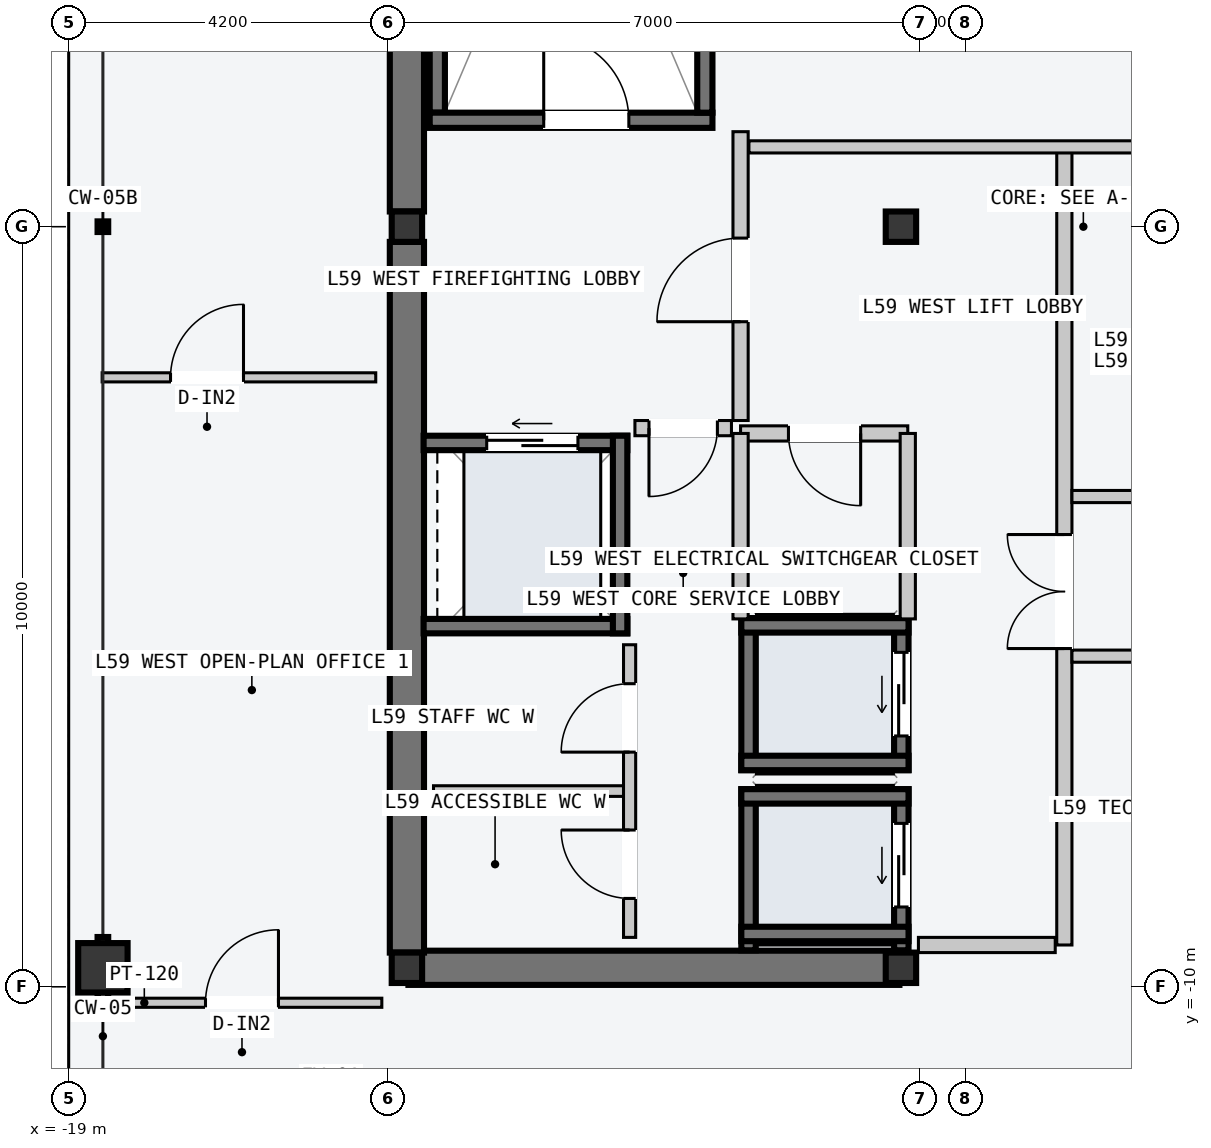
"""IFC4 building model, lengths in metres.
Left out: names, types, materials, properties, quantities, classifications, styles, units other than length and angle.
Written with IfcOpenShell. Run it as: python <this file> out.ifc"""

import sys

from ifc_helpers import new_model, si_unit, direction, frame, frame_2d, origin, origin_2d, place, context, subcontext, project, spatial, rectangle, hollow_rectangle, i_section, extrude, element, fill, save


model = new_model("IFC4")
c1 = context("Model", 3, precision=1e-05, world=origin(), true_north=direction((0.0, 1.0)))
c2 = subcontext(c1, "Body", "Model", "MODEL_VIEW")
j1 = project(units=[si_unit("LENGTHUNIT", "METRE"), si_unit("PLANEANGLEUNIT", "RADIAN")], contexts=[c1])
p1 = place(None, origin())
s1 = spatial("IfcSite", under=j1, at=p1, CompositionType="ELEMENT")
p2 = place(p1, origin())
s2 = spatial("IfcBuilding", under=s1, at=p2, CompositionType="ELEMENT")
p3 = place(p2, frame((0.0, 0.0, 225.6)))
s3 = spatial("IfcBuildingStorey", under=s2, at=p3, CompositionType="ELEMENT", Elevation=225.6)
p4 = place(p3, frame((-14.53, -9.75, -0.2), z_axis=(0.0, 0.0, 1.0), x_axis=(1.0, 0.0, 0.0)))
e1 = element("IfcWall", 1, at=p4, inside=s3, PredefinedType="SHEAR", context=c2, shape_type="SweptSolid", body=[
    extrude(rectangle(XDim=6.46, YDim=0.45, at=frame_2d((3.23, 0.0))), origin(), (0.0, 0.0, 1.0), 3.6),
])
for number, where, z_axis, x_axis in (
    (2, (-14.55, -9.55, -0.2), (0.0, 0.0, 1.0), (0.0, 1.0, 0.0)),
    (3, (-14.55, 0.2, -0.2), (0.0, 0.0, 1.0), (0.0, 1.0, 0.0)),
):
    element("IfcWall", number, at=place(p3, frame(where, z_axis=z_axis, x_axis=x_axis)), inside=s3, PredefinedType="SHEAR", context=c2, shape_type="SweptSolid", body=[
        extrude(rectangle(XDim=9.35, YDim=0.45, at=frame_2d((4.675, 0.0))), origin(), (0.0, 0.0, 1.0), 3.6),
    ])
p5 = place(p3, frame((-14.15, 1.5, -0.2), z_axis=(0.0, 0.0, 1.0), x_axis=(0.0, 1.0, 0.0)))
e4 = element("IfcWall", 4, at=p5, inside=s3, PredefinedType="SOLIDWALL", context=c2, shape_type="SweptSolid", body=[
    extrude(rectangle(XDim=7.8, YDim=0.2, at=frame_2d((3.9, 0.0))), origin(), (0.0, 0.0, 1.0), 3.6),
])
p6 = place(p3, frame((-14.25, 1.4, -0.2), z_axis=(0.0, 0.0, 1.0), x_axis=(1.0, 0.0, 0.0)))
e5 = element("IfcWall", 5, at=p6, inside=s3, PredefinedType="SOLIDWALL", context=c2, shape_type="SweptSolid", body=[
    extrude(rectangle(XDim=3.72, YDim=0.2, at=frame_2d((1.86, 0.0))), origin(), (0.0, 0.0, 1.0), 3.6),
])
p7 = place(p6, frame((1.5, 0.0, 0.2)))
e6 = element("IfcOpeningElement", 6, at=p7, cuts=e5, PredefinedType="OPENING", context=c2, shape_type="SweptSolid", body=[
    extrude(rectangle(XDim=1.12, YDim=2.18, at=frame_2d((0.56, 1.09))), frame((0.0, 0.11, 0.0), z_axis=(0.0, -1.0, 0.0), x_axis=(1.0, 0.0, 0.0)), (0.0, 0.0, 1.0), 0.22),
])
p8 = place(p3, frame((-10.63, 1.5, -0.2), z_axis=(0.0, 0.0, 1.0), x_axis=(0.0, 1.0, 0.0)))
e7 = element("IfcWall", 7, at=p8, inside=s3, PredefinedType="SOLIDWALL", context=c2, shape_type="SweptSolid", body=[
    extrude(rectangle(XDim=7.8, YDim=0.2, at=frame_2d((3.9, 0.0))), origin(), (0.0, 0.0, 1.0), 3.6),
])
for number, where, z_axis, x_axis in (
    (8, (-14.55, -9.75, 0.0), (0.0, 0.0, 1.0), (1.0, 0.0, 0.0)),
    (9, (-14.55, 0.0, 0.0), (0.0, 0.0, 1.0), (1.0, 0.0, 0.0)),
    (10, (-8.05, -9.75, 0.0), (0.0, 0.0, 1.0), (1.0, 0.0, 0.0)),
    (11, (-8.05, 0.0, 0.0), (0.0, 0.0, 1.0), (1.0, 0.0, 0.0)),
):
    element("IfcColumn", number, at=place(p3, frame(where, z_axis=z_axis, x_axis=x_axis)), inside=s3, PredefinedType="COLUMN", context=c2, shape_type="SweptSolid", body=[
        extrude(i_section(OverallWidth=0.4, OverallDepth=0.4, WebThickness=0.013, FlangeThickness=0.021, at=origin_2d()), origin(), (0.0, 0.0, 1.0), 3.6),
    ])
p9 = place(p3, frame((-18.55, -9.75, 0.0), z_axis=(0.0, 0.0, 1.0), x_axis=(0.0, 1.0, 0.0)))
e12 = element("IfcColumn", 12, at=p9, inside=s3, PredefinedType="COLUMN", context=c2, shape_type="SweptSolid", body=[
    extrude(hollow_rectangle(XDim=0.65, YDim=0.65, WallThickness=0.028, at=origin_2d()), origin(), (0.0, 0.0, 1.0), 3.6),
])
p10 = place(p3, frame((-8.045, -9.52, -0.2), z_axis=(0.0, 0.0, 1.0), x_axis=(0.0, 1.0, 0.0)))
e13 = element("IfcWall", 13, at=p10, inside=s3, PredefinedType="SOLIDWALL", context=c2, shape_type="SweptSolid", body=[
    extrude(rectangle(XDim=2.12, YDim=0.19, at=frame_2d((1.06, 0.0))), origin(), (0.0, 0.0, 1.0), 3.6),
])
p11 = place(p10, frame((0.57, 0.0, 0.2)))
e14 = element("IfcOpeningElement", 14, at=p11, cuts=e13, PredefinedType="OPENING", context=c2, shape_type="SweptSolid", body=[
    extrude(rectangle(XDim=1.1, YDim=2.2, at=frame_2d((0.55, 1.1))), frame((0.0, 0.105, 0.0), z_axis=(0.0, -1.0, 0.0), x_axis=(1.0, 0.0, 0.0)), (0.0, 0.0, 1.0), 0.21),
])
p12 = place(p3, frame((-10.055, -9.52, -0.2), z_axis=(0.0, 0.0, 1.0), x_axis=(0.0, 1.0, 0.0)))
e15 = element("IfcWall", 15, at=p12, inside=s3, PredefinedType="SOLIDWALL", context=c2, shape_type="SweptSolid", body=[
    extrude(rectangle(XDim=2.12, YDim=0.19, at=frame_2d((1.06, 0.0))), origin(), (0.0, 0.0, 1.0), 3.6),
])
for number, where, z_axis, x_axis in (
    (16, (-10.15, -7.495, -0.2), (0.0, 0.0, 1.0), (1.0, 0.0, 0.0)),
    (17, (-10.15, -9.305, -0.2), (0.0, 0.0, 1.0), (1.0, 0.0, 0.0)),
):
    element("IfcWall", number, at=place(p3, frame(where, z_axis=z_axis, x_axis=x_axis)), inside=s3, PredefinedType="SOLIDWALL", context=c2, shape_type="SweptSolid", body=[
        extrude(rectangle(XDim=2.2, YDim=0.19, at=frame_2d((1.1, 0.0))), origin(), (0.0, 0.0, 1.0), 3.6),
    ])
p13 = place(p3, frame((-8.045, -7.15, -0.2), z_axis=(0.0, 0.0, 1.0), x_axis=(0.0, 1.0, 0.0)))
e18 = element("IfcWall", 18, at=p13, inside=s3, PredefinedType="SOLIDWALL", context=c2, shape_type="SweptSolid", body=[
    extrude(rectangle(XDim=2.0, YDim=0.19, at=frame_2d((1.0, 0.0))), origin(), (0.0, 0.0, 1.0), 3.6),
])
p14 = place(p13, frame((0.45, 0.0, 0.2)))
e19 = element("IfcOpeningElement", 19, at=p14, cuts=e18, PredefinedType="OPENING", context=c2, shape_type="SweptSolid", body=[
    extrude(rectangle(XDim=1.1, YDim=2.2, at=frame_2d((0.55, 1.1))), frame((0.0, 0.105, 0.0), z_axis=(0.0, -1.0, 0.0), x_axis=(1.0, 0.0, 0.0)), (0.0, 0.0, 1.0), 0.21),
])
p15 = place(p3, frame((-10.055, -7.15, -0.2), z_axis=(0.0, 0.0, 1.0), x_axis=(0.0, 1.0, 0.0)))
e20 = element("IfcWall", 20, at=p15, inside=s3, PredefinedType="SOLIDWALL", context=c2, shape_type="SweptSolid", body=[
    extrude(rectangle(XDim=2.0, YDim=0.19, at=frame_2d((1.0, 0.0))), origin(), (0.0, 0.0, 1.0), 3.6),
])
for number, where, z_axis, x_axis in (
    (21, (-10.15, -5.245, -0.2), (0.0, 0.0, 1.0), (1.0, 0.0, 0.0)),
    (22, (-10.15, -7.055, -0.2), (0.0, 0.0, 1.0), (1.0, 0.0, 0.0)),
):
    element("IfcWall", number, at=place(p3, frame(where, z_axis=z_axis, x_axis=x_axis)), inside=s3, PredefinedType="SOLIDWALL", context=c2, shape_type="SweptSolid", body=[
        extrude(rectangle(XDim=2.2, YDim=0.19, at=frame_2d((1.1, 0.0))), origin(), (0.0, 0.0, 1.0), 3.6),
    ])
p16 = place(p3, frame((-14.33, -2.845, -0.2), z_axis=(0.0, 0.0, 1.0), x_axis=(1.0, 0.0, 0.0)))
e23 = element("IfcWall", 23, at=p16, inside=s3, PredefinedType="SOLIDWALL", context=c2, shape_type="SweptSolid", body=[
    extrude(rectangle(XDim=2.68, YDim=0.19, at=frame_2d((1.34, 0.0))), origin(), (0.0, 0.0, 1.0), 3.6),
])
p17 = place(p16, frame((0.83, 0.0, 0.2)))
e24 = element("IfcOpeningElement", 24, at=p17, cuts=e23, PredefinedType="OPENING", context=c2, shape_type="SweptSolid", body=[
    extrude(rectangle(XDim=1.2, YDim=2.2, at=frame_2d((0.6, 1.1))), frame((0.0, 0.105, 0.0), z_axis=(0.0, -1.0, 0.0), x_axis=(1.0, 0.0, 0.0)), (0.0, 0.0, 1.0), 0.21),
])
p18 = place(p3, frame((-14.33, -5.255, -0.2), z_axis=(0.0, 0.0, 1.0), x_axis=(1.0, 0.0, 0.0)))
e25 = element("IfcWall", 25, at=p18, inside=s3, PredefinedType="SOLIDWALL", context=c2, shape_type="SweptSolid", body=[
    extrude(rectangle(XDim=2.68, YDim=0.19, at=frame_2d((1.34, 0.0))), origin(), (0.0, 0.0, 1.0), 3.6),
])
p19 = place(p3, frame((-11.745, -5.35, -0.2), z_axis=(0.0, 0.0, 1.0), x_axis=(0.0, 1.0, 0.0)))
e26 = element("IfcWall", 26, at=p19, inside=s3, PredefinedType="SOLIDWALL", context=c2, shape_type="SweptSolid", body=[
    extrude(rectangle(XDim=2.6, YDim=0.19, at=frame_2d((1.3, 0.0))), origin(), (0.0, 0.0, 1.0), 3.6),
])
p20 = place(p3, frame((-5.9, -9.45, 0.0), z_axis=(0.0, 0.0, 1.0), x_axis=(0.0, 1.0, 0.0)))
e27 = element("IfcWall", 27, at=p20, inside=s3, PredefinedType="PARTITIONING", context=c2, shape_type="SweptSolid", body=[
    extrude(rectangle(XDim=10.5, YDim=0.2, at=frame_2d((5.25, 0.0))), origin(), (0.0, 0.0, 1.0), 3.4),
])
p21 = place(p20, frame((3.9, 0.0, 0.0)))
e28 = element("IfcOpeningElement", 28, at=p21, cuts=e27, PredefinedType="OPENING", context=c2, shape_type="SweptSolid", body=[
    extrude(rectangle(XDim=1.5, YDim=2.2, at=frame_2d((0.75, 1.1))), frame((0.0, 0.11, 0.0), z_axis=(0.0, -1.0, 0.0), x_axis=(1.0, 0.0, 0.0)), (0.0, 0.0, 1.0), 0.22),
])
p22 = place(p3, frame((-6.02, -9.45, 0.0), z_axis=(0.0, 0.0, 1.0), x_axis=(-1.0, 0.0, 0.0)))
e29 = element("IfcWall", 29, at=p22, inside=s3, PredefinedType="PARTITIONING", context=c2, shape_type="SweptSolid", body=[
    extrude(rectangle(XDim=1.8, YDim=0.2, at=frame_2d((0.9, 0.0))), origin(), (0.0, 0.0, 1.0), 3.4),
])
p23 = place(p3, frame((-10.16, -2.55, 0.0), z_axis=(0.0, 0.0, 1.0), x_axis=(0.0, 1.0, 0.0)))
e30 = element("IfcWall", 30, at=p23, inside=s3, PredefinedType="PARTITIONING", context=c2, shape_type="SweptSolid", body=[
    extrude(rectangle(XDim=3.8, YDim=0.2, at=frame_2d((1.9, 0.0))), origin(), (0.0, 0.0, 1.0), 3.4),
])
p24 = place(p23, frame((1.3, 0.0, 0.0)))
e31 = element("IfcOpeningElement", 31, at=p24, cuts=e30, PredefinedType="OPENING", context=c2, shape_type="SweptSolid", body=[
    extrude(rectangle(XDim=1.1, YDim=2.15, at=frame_2d((0.55, 1.075))), frame((0.0, 0.11, 0.0), z_axis=(0.0, -1.0, 0.0), x_axis=(1.0, 0.0, 0.0)), (0.0, 0.0, 1.0), 0.22),
])
p25 = place(p3, frame((-10.28, -2.65, 0.0), z_axis=(0.0, 0.0, 1.0), x_axis=(-1.0, 0.0, 0.0)))
e32 = element("IfcWall", 32, at=p25, inside=s3, PredefinedType="PARTITIONING", context=c2, shape_type="SweptSolid", body=[
    extrude(rectangle(XDim=1.27, YDim=0.2, at=frame_2d((0.635, 0.0))), origin(), (0.0, 0.0, 1.0), 3.4),
])
p26 = place(p25, frame((0.185, 0.0, 0.0)))
e33 = element("IfcOpeningElement", 33, at=p26, cuts=e32, PredefinedType="OPENING", context=c2, shape_type="SweptSolid", body=[
    extrude(rectangle(XDim=0.9, YDim=2.15, at=frame_2d((0.45, 1.075))), frame((0.0, 0.11, 0.0), z_axis=(0.0, -1.0, 0.0), x_axis=(1.0, 0.0, 0.0)), (0.0, 0.0, 1.0), 0.22),
])
p27 = place(p3, frame((-7.96, -2.72, 0.0), z_axis=(0.0, 0.0, 1.0), x_axis=(-1.0, 0.0, 0.0)))
e34 = element("IfcWall", 34, at=p27, inside=s3, PredefinedType="PARTITIONING", context=c2, shape_type="SweptSolid", body=[
    extrude(rectangle(XDim=2.2, YDim=0.2, at=frame_2d((1.1, 0.0))), origin(), (0.0, 0.0, 1.0), 3.4),
])
p28 = place(p27, frame((0.62, 0.0, 0.0)))
e35 = element("IfcOpeningElement", 35, at=p28, cuts=e34, PredefinedType="OPENING", context=c2, shape_type="SweptSolid", body=[
    extrude(rectangle(XDim=0.95, YDim=2.1, at=frame_2d((0.475, 1.05))), frame((0.0, 0.11, 0.0), z_axis=(0.0, -1.0, 0.0), x_axis=(1.0, 0.0, 0.0)), (0.0, 0.0, 1.0), 0.22),
])
for number, where, z_axis, x_axis in (
    (36, (-7.96, -5.16, 0.0), (0.0, 0.0, 1.0), (0.0, 1.0, 0.0)),
    (37, (-10.16, -5.16, 0.0), (0.0, 0.0, 1.0), (0.0, 1.0, 0.0)),
):
    element("IfcWall", number, at=place(p3, frame(where, z_axis=z_axis, x_axis=x_axis)), inside=s3, PredefinedType="PARTITIONING", context=c2, shape_type="SweptSolid", body=[
        extrude(rectangle(XDim=2.44, YDim=0.2, at=frame_2d((1.22, 0.0))), origin(), (0.0, 0.0, 1.0), 3.4),
    ])
p29 = place(p3, frame((-11.7, -7.425, 0.0), z_axis=(0.0, 0.0, 1.0), x_axis=(-1.0, 0.0, 0.0)))
e38 = element("IfcWall", 38, at=p29, inside=s3, PredefinedType="PARTITIONING", context=c2, shape_type="SweptSolid", body=[
    extrude(rectangle(XDim=2.5, YDim=0.14, at=frame_2d((1.25, 0.0))), origin(), (0.0, 0.0, 1.0), 3.4),
])
p30 = place(p3, frame((-11.62, -9.35, 0.0), z_axis=(0.0, 0.0, 1.0), x_axis=(0.0, 1.0, 0.0)))
e39 = element("IfcWall", 39, at=p30, inside=s3, PredefinedType="PARTITIONING", context=c2, shape_type="SweptSolid", body=[
    extrude(rectangle(XDim=3.85, YDim=0.16, at=frame_2d((1.925, 0.0))), origin(), (0.0, 0.0, 1.0), 3.4),
])
p31 = place(p30, frame((0.512, 0.0, 0.0)))
e40 = element("IfcOpeningElement", 40, at=p31, cuts=e39, PredefinedType="OPENING", context=c2, shape_type="SweptSolid", body=[
    extrude(rectangle(XDim=0.9, YDim=2.15, at=frame_2d((0.45, 1.075))), frame((0.0, 0.09, 0.0), z_axis=(0.0, -1.0, 0.0), x_axis=(1.0, 0.0, 0.0)), (0.0, 0.0, 1.0), 0.18),
])
p32 = place(p30, frame((2.438, 0.0, 0.0)))
e41 = element("IfcOpeningElement", 41, at=p32, cuts=e39, PredefinedType="OPENING", context=c2, shape_type="SweptSolid", body=[
    extrude(rectangle(XDim=0.9, YDim=2.15, at=frame_2d((0.45, 1.075))), frame((0.0, 0.09, 0.0), z_axis=(0.0, -1.0, 0.0), x_axis=(1.0, 0.0, 0.0)), (0.0, 0.0, 1.0), 0.18),
])
p33 = place(p3, frame((-10.05, 1.05, 0.0), z_axis=(0.0, 0.0, 1.0), x_axis=(1.0, 0.0, 0.0)))
e42 = element("IfcWall", 42, at=p33, inside=s3, PredefinedType="PARTITIONING", context=c2, shape_type="SweptSolid", body=[
    extrude(rectangle(XDim=8.79, YDim=0.16, at=frame_2d((4.395, 0.0))), origin(), (0.0, 0.0, 1.0), 3.4),
])
for number, where, z_axis, x_axis in (
    (43, (-5.8, -3.55, 0.0), (0.0, 0.0, 1.0), (1.0, 0.0, 0.0)),
    (44, (-5.8, -5.65, 0.0), (0.0, 0.0, 1.0), (1.0, 0.0, 0.0)),
):
    element("IfcWall", number, at=place(p3, frame(where, z_axis=z_axis, x_axis=x_axis)), inside=s3, PredefinedType="PARTITIONING", context=c2, shape_type="SweptSolid", body=[
        extrude(rectangle(XDim=4.54, YDim=0.16, at=frame_2d((2.27, 0.0))), origin(), (0.0, 0.0, 1.0), 3.4),
    ])
p34 = place(p3, frame((-18.56, -10.21, 0.0), z_axis=(0.0, 0.0, 1.0), x_axis=(1.0, 0.0, 0.0)))
e45 = element("IfcWall", 45, at=p34, inside=s3, PredefinedType="PARTITIONING", context=c2, shape_type="SweptSolid", body=[
    extrude(rectangle(XDim=3.68, YDim=0.12, at=frame_2d((1.84, 0.0))), origin(), (0.0, 0.0, 1.0), 3.4),
])
p35 = place(p34, frame((1.36, 0.0, 0.0)))
e46 = element("IfcOpeningElement", 46, at=p35, cuts=e45, PredefinedType="OPENING", context=c2, shape_type="SweptSolid", body=[
    extrude(rectangle(XDim=0.96, YDim=2.18, at=frame_2d((0.48, 1.09))), frame((0.0, 0.07, 0.0), z_axis=(0.0, -1.0, 0.0), x_axis=(1.0, 0.0, 0.0)), (0.0, 0.0, 1.0), 0.14),
])
p36 = place(p3, frame((-18.56, -1.982, 0.0), z_axis=(0.0, 0.0, 1.0), x_axis=(1.0, 0.0, 0.0)))
e47 = element("IfcWall", 47, at=p36, inside=s3, PredefinedType="PARTITIONING", context=c2, shape_type="SweptSolid", body=[
    extrude(rectangle(XDim=3.6, YDim=0.12, at=frame_2d((1.8, 0.0))), origin(), (0.0, 0.0, 1.0), 3.4),
])
p37 = place(p36, frame((0.9, 0.0, 0.0)))
e48 = element("IfcOpeningElement", 48, at=p37, cuts=e47, PredefinedType="OPENING", context=c2, shape_type="SweptSolid", body=[
    extrude(rectangle(XDim=0.96, YDim=2.18, at=frame_2d((0.48, 1.09))), frame((0.0, 0.07, 0.0), z_axis=(0.0, -1.0, 0.0), x_axis=(1.0, 0.0, 0.0)), (0.0, 0.0, 1.0), 0.14),
])
p38 = place(p7, origin())
e49 = element("IfcDoor", 49, at=p38, inside=s3, OperationType="SINGLE_SWING_LEFT", PredefinedType="DOOR", context=c2, shape_type="SweptSolid", body=[
    extrude(rectangle(XDim=1.12, YDim=2.18, at=frame_2d((0.56, 1.09))), frame((0.0, 0.025, 0.0), z_axis=(0.0, -1.0, 0.0), x_axis=(1.0, 0.0, 0.0)), (0.0, 0.0, 1.0), 0.05),
])
fill(e6, e49)
p39 = place(p11, origin())
e50 = element("IfcDoor", 50, at=p39, inside=s3, OperationType="SLIDING_TO_LEFT", PredefinedType="DOOR", context=c2, shape_type="SweptSolid", body=[
    extrude(rectangle(XDim=1.1, YDim=2.2, at=frame_2d((0.55, 1.1))), frame((0.0, 0.025, 0.0), z_axis=(0.0, -1.0, 0.0), x_axis=(1.0, 0.0, 0.0)), (0.0, 0.0, 1.0), 0.05),
])
fill(e14, e50)
p40 = place(p14, origin())
e51 = element("IfcDoor", 51, at=p40, inside=s3, OperationType="SLIDING_TO_LEFT", PredefinedType="DOOR", context=c2, shape_type="SweptSolid", body=[
    extrude(rectangle(XDim=1.1, YDim=2.2, at=frame_2d((0.55, 1.1))), frame((0.0, 0.025, 0.0), z_axis=(0.0, -1.0, 0.0), x_axis=(1.0, 0.0, 0.0)), (0.0, 0.0, 1.0), 0.05),
])
fill(e19, e51)
p41 = place(p17, origin())
e52 = element("IfcDoor", 52, at=p41, inside=s3, OperationType="SLIDING_TO_LEFT", PredefinedType="DOOR", context=c2, shape_type="SweptSolid", body=[
    extrude(rectangle(XDim=1.2, YDim=2.2, at=frame_2d((0.6, 1.1))), frame((0.0, 0.025, 0.0), z_axis=(0.0, -1.0, 0.0), x_axis=(1.0, 0.0, 0.0)), (0.0, 0.0, 1.0), 0.05),
])
fill(e24, e52)
p42 = place(p21, origin())
e53 = element("IfcDoor", 53, at=p42, inside=s3, OperationType="DOUBLE_DOOR_SINGLE_SWING", PredefinedType="DOOR", context=c2, shape_type="SweptSolid", body=[
    extrude(rectangle(XDim=1.5, YDim=2.2, at=frame_2d((0.75, 1.1))), frame((0.0, 0.025, 0.0), z_axis=(0.0, -1.0, 0.0), x_axis=(1.0, 0.0, 0.0)), (0.0, 0.0, 1.0), 0.05),
])
fill(e28, e53)
p43 = place(p24, origin())
e54 = element("IfcDoor", 54, at=p43, inside=s3, OperationType="SINGLE_SWING_LEFT", PredefinedType="DOOR", context=c2, shape_type="SweptSolid", body=[
    extrude(rectangle(XDim=1.1, YDim=2.15, at=frame_2d((0.55, 1.075))), frame((0.0, 0.025, 0.0), z_axis=(0.0, -1.0, 0.0), x_axis=(1.0, 0.0, 0.0)), (0.0, 0.0, 1.0), 0.05),
])
fill(e31, e54)
p44 = place(p26, origin())
e55 = element("IfcDoor", 55, at=p44, inside=s3, OperationType="SINGLE_SWING_RIGHT", PredefinedType="DOOR", context=c2, shape_type="SweptSolid", body=[
    extrude(rectangle(XDim=0.9, YDim=2.15, at=frame_2d((0.45, 1.075))), frame((0.0, 0.025, 0.0), z_axis=(0.0, -1.0, 0.0), x_axis=(1.0, 0.0, 0.0)), (0.0, 0.0, 1.0), 0.05),
])
fill(e33, e55)
p45 = place(p28, origin())
e56 = element("IfcDoor", 56, at=p45, inside=s3, OperationType="SINGLE_SWING_LEFT", PredefinedType="DOOR", context=c2, shape_type="SweptSolid", body=[
    extrude(rectangle(XDim=0.95, YDim=2.1, at=frame_2d((0.475, 1.05))), frame((0.0, 0.025, 0.0), z_axis=(0.0, -1.0, 0.0), x_axis=(1.0, 0.0, 0.0)), (0.0, 0.0, 1.0), 0.05),
])
fill(e35, e56)
p46 = place(p31, origin())
e57 = element("IfcDoor", 57, at=p46, inside=s3, OperationType="SINGLE_SWING_RIGHT", PredefinedType="DOOR", context=c2, shape_type="SweptSolid", body=[
    extrude(rectangle(XDim=0.9, YDim=2.15, at=frame_2d((0.45, 1.075))), frame((0.0, 0.025, 0.0), z_axis=(0.0, -1.0, 0.0), x_axis=(1.0, 0.0, 0.0)), (0.0, 0.0, 1.0), 0.05),
])
fill(e40, e57)
p47 = place(p32, origin())
e58 = element("IfcDoor", 58, at=p47, inside=s3, OperationType="SINGLE_SWING_LEFT", PredefinedType="DOOR", context=c2, shape_type="SweptSolid", body=[
    extrude(rectangle(XDim=0.9, YDim=2.15, at=frame_2d((0.45, 1.075))), frame((0.0, 0.025, 0.0), z_axis=(0.0, -1.0, 0.0), x_axis=(1.0, 0.0, 0.0)), (0.0, 0.0, 1.0), 0.05),
])
fill(e41, e58)
p48 = place(p35, origin())
e59 = element("IfcDoor", 59, at=p48, inside=s3, OperationType="SINGLE_SWING_RIGHT", PredefinedType="DOOR", context=c2, shape_type="SweptSolid", body=[
    extrude(rectangle(XDim=0.96, YDim=2.18, at=frame_2d((0.48, 1.09))), frame((0.0, 0.025, 0.0), z_axis=(0.0, -1.0, 0.0), x_axis=(1.0, 0.0, 0.0)), (0.0, 0.0, 1.0), 0.05),
])
fill(e46, e59)
p49 = place(p37, origin())
e60 = element("IfcDoor", 60, at=p49, inside=s3, OperationType="SINGLE_SWING_RIGHT", PredefinedType="DOOR", context=c2, shape_type="SweptSolid", body=[
    extrude(rectangle(XDim=0.96, YDim=2.18, at=frame_2d((0.48, 1.09))), frame((0.0, 0.025, 0.0), z_axis=(0.0, -1.0, 0.0), x_axis=(1.0, 0.0, 0.0)), (0.0, 0.0, 1.0), 0.05),
])
fill(e48, e60)
save(model, sys.argv[1])
